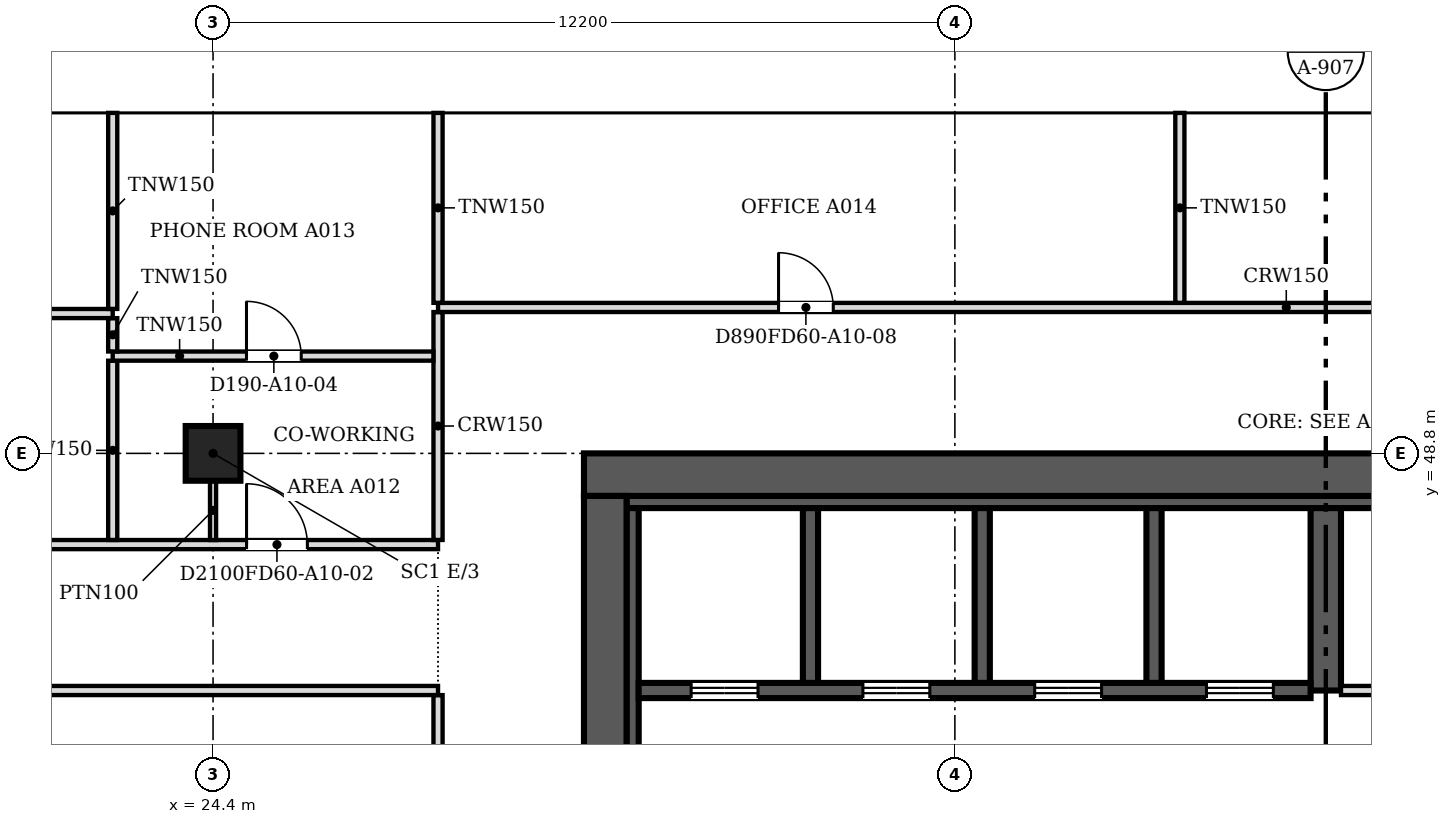
"""IFC4 building model, lengths in metres.
Left out: names, types, materials, properties, quantities, classifications, styles, units other than length and angle.
Written with IfcOpenShell. Run it as: python <this file> out.ifc"""

import sys

from ifc_helpers import new_model, si_unit, direction, frame, frame_2d, origin, origin_2d, place, context, subcontext, project, spatial, polyline, rectangle, outline, extrude, faceted_brep, source, transform, mapped, element, fill, save


model = new_model("IFC4")
c1 = context("Model", 3, precision=1e-05, world=origin(), true_north=direction((0.0, 1.0)))
c2 = subcontext(c1, "Body", "Model", "MODEL_VIEW")
j1 = project(units=[si_unit("LENGTHUNIT", "METRE"), si_unit("PLANEANGLEUNIT", "RADIAN")], contexts=[c1])
p1 = place(None, origin())
s1 = spatial("IfcSite", under=j1, at=p1, CompositionType="ELEMENT")
p2 = place(p1, origin())
s2 = spatial("IfcBuilding", under=s1, at=p2, CompositionType="ELEMENT")
p3 = place(p2, frame((0.0, 0.0, 120.2)))
s3 = spatial("IfcBuildingStorey", under=s2, at=p3, CompositionType="ELEMENT", Elevation=120.2)
p4 = place(p3, frame((24.4, 48.8, 0.0), z_axis=(0.0, 0.0, 1.0), x_axis=(1.0, 0.0, 0.0)))
e1 = element("IfcColumn", 1, at=p4, inside=s3, PredefinedType="COLUMN", context=c2, shape_type="SweptSolid", body=[
    extrude(rectangle(XDim=0.9, YDim=0.9, at=origin_2d()), origin(), (0.0, 0.0, 1.0), 3.6),
])
m1 = source(origin(), c2, "Body", "SweptSolid", [
    extrude(outline(polyline([(3.05, 0.0), (6.1, 3.8), (3.05, 7.6), (0.0, 3.8), (3.05, 0.0)])), frame((0.0, 0.25, 0.0), z_axis=(0.0, -1.0, 0.0), x_axis=(1.0, 0.0, 0.0)), (0.0, 0.0, 1.0), 0.5),
])
p5 = place(p3, frame((45.75, 54.65, -3.8), z_axis=(0.0, 0.0, 1.0), x_axis=(-1.0, 0.0, 0.0)))
e2 = element("IfcWall", 2, at=p5, inside=s3, PredefinedType="SOLIDWALL", context=c2, shape_type="MappedRepresentation", body=[
    mapped(m1, transform((0.0, 0.0, 0.0), scale=1.0)),
])
m2 = source(origin(), c2, "Body", "SweptSolid", [
    extrude(outline(polyline([(3.05, 0.399), (5.78, 3.8), (3.05, 7.201), (0.321, 3.8), (3.05, 0.399)])), frame((0.0, 0.26, 0.0), z_axis=(0.0, -1.0, 0.0), x_axis=(1.0, 0.0, 0.0)), (0.0, 0.0, 1.0), 0.52),
])
p6 = place(p5, origin())
e3 = element("IfcOpeningElement", 3, at=p6, cuts=e2, PredefinedType="OPENING", context=c2, shape_type="MappedRepresentation", body=[
    mapped(m2, transform((0.0, 0.0, 0.0), scale=1.0)),
])
m3 = source(origin(), c2, "Body", "Brep", [
    faceted_brep([(3.05, -0.25, 0.0), (6.1, -0.25, 3.8), (6.1, -0.25, 3.8), (3.05, -0.25, 7.6), (0.0, -0.25, 3.8), (0.0, 0.25, 3.8), (3.05, 0.25, 7.6), (6.1, 0.25, 3.8), (6.1, 0.25, 3.8), (3.05, 0.25, 0.0)], [[[0, 1, 2, 3, 4]], [[5, 6, 7, 8, 9]], [[9, 8, 1, 0]], [[7, 6, 3, 2]], [[6, 5, 4, 3]], [[5, 9, 0, 4]], [[1, 8, 7, 2]]]),
])
p7 = place(p3, frame((39.65, 54.65, -3.8), z_axis=(0.0, 0.0, 1.0), x_axis=(-1.0, 0.0, 0.0)))
e4 = element("IfcWall", 4, at=p7, inside=s3, PredefinedType="SOLIDWALL", context=c2, shape_type="MappedRepresentation", body=[
    mapped(m3, transform((0.0, 0.0, 0.0), scale=1.0)),
])
p8 = place(p7, origin())
e5 = element("IfcOpeningElement", 5, at=p8, cuts=e4, PredefinedType="OPENING", context=c2, shape_type="MappedRepresentation", body=[
    mapped(m2, transform((0.0, 0.0, 0.0), scale=1.0)),
])
p9 = place(p3, frame((33.55, 54.65, -3.8), z_axis=(0.0, 0.0, 1.0), x_axis=(-1.0, 0.0, 0.0)))
e6 = element("IfcWall", 6, at=p9, inside=s3, PredefinedType="SOLIDWALL", context=c2, shape_type="MappedRepresentation", body=[
    mapped(m1, transform((0.0, 0.0, 0.0), scale=1.0)),
])
p10 = place(p9, origin())
e7 = element("IfcOpeningElement", 7, at=p10, cuts=e6, PredefinedType="OPENING", context=c2, shape_type="MappedRepresentation", body=[
    mapped(m2, transform((0.0, 0.0, 0.0), scale=1.0)),
])
p11 = place(p3, frame((27.45, 54.65, -3.8), z_axis=(0.0, 0.0, 1.0), x_axis=(-1.0, 0.0, 0.0)))
e8 = element("IfcWall", 8, at=p11, inside=s3, PredefinedType="SOLIDWALL", context=c2, shape_type="MappedRepresentation", body=[
    mapped(m3, transform((0.0, 0.0, 0.0), scale=1.0)),
])
p12 = place(p11, origin())
e9 = element("IfcOpeningElement", 9, at=p12, cuts=e8, PredefinedType="OPENING", context=c2, shape_type="MappedRepresentation", body=[
    mapped(m2, transform((0.0, 0.0, 0.0), scale=1.0)),
])
p13 = place(p2, frame((0.0, 0.0, 124.0)))
s4 = spatial("IfcBuildingStorey", under=s2, at=p13, CompositionType="ELEMENT", Elevation=124.0)
p14 = place(p13, frame((48.8, 54.65, -3.8), z_axis=(0.0, 0.0, 1.0), x_axis=(-1.0, 0.0, 0.0)))
e10 = element("IfcWall", 10, at=p14, inside=s4, PredefinedType="SOLIDWALL", context=c2, shape_type="MappedRepresentation", body=[
    mapped(m1, transform((0.0, 0.0, 0.0), scale=1.0)),
])
p15 = place(p14, origin())
e11 = element("IfcOpeningElement", 11, at=p15, cuts=e10, PredefinedType="OPENING", context=c2, shape_type="MappedRepresentation", body=[
    mapped(m2, transform((0.0, 0.0, 0.0), scale=1.0)),
])
p16 = place(p13, frame((42.7, 54.65, -3.8), z_axis=(0.0, 0.0, 1.0), x_axis=(-1.0, 0.0, 0.0)))
e12 = element("IfcWall", 12, at=p16, inside=s4, PredefinedType="SOLIDWALL", context=c2, shape_type="MappedRepresentation", body=[
    mapped(m3, transform((0.0, 0.0, 0.0), scale=1.0)),
])
p17 = place(p16, origin())
e13 = element("IfcOpeningElement", 13, at=p17, cuts=e12, PredefinedType="OPENING", context=c2, shape_type="MappedRepresentation", body=[
    mapped(m2, transform((0.0, 0.0, 0.0), scale=1.0)),
])
p18 = place(p13, frame((36.6, 54.65, -3.8), z_axis=(0.0, 0.0, 1.0), x_axis=(-1.0, 0.0, 0.0)))
e14 = element("IfcWall", 14, at=p18, inside=s4, PredefinedType="SOLIDWALL", context=c2, shape_type="MappedRepresentation", body=[
    mapped(m1, transform((0.0, 0.0, 0.0), scale=1.0)),
])
p19 = place(p18, origin())
e15 = element("IfcOpeningElement", 15, at=p19, cuts=e14, PredefinedType="OPENING", context=c2, shape_type="MappedRepresentation", body=[
    mapped(m2, transform((0.0, 0.0, 0.0), scale=1.0)),
])
p20 = place(p13, frame((30.5, 54.65, -3.8), z_axis=(0.0, 0.0, 1.0), x_axis=(-1.0, 0.0, 0.0)))
e16 = element("IfcWall", 16, at=p20, inside=s4, PredefinedType="SOLIDWALL", context=c2, shape_type="MappedRepresentation", body=[
    mapped(m1, transform((0.0, 0.0, 0.0), scale=1.0)),
])
p21 = place(p20, origin())
e17 = element("IfcOpeningElement", 17, at=p21, cuts=e16, PredefinedType="OPENING", context=c2, shape_type="MappedRepresentation", body=[
    mapped(m2, transform((0.0, 0.0, 0.0), scale=1.0)),
])
p22 = place(p13, frame((24.4, 54.65, -3.8), z_axis=(0.0, 0.0, 1.0), x_axis=(-1.0, 0.0, 0.0)))
e18 = element("IfcWall", 18, at=p22, inside=s4, PredefinedType="SOLIDWALL", context=c2, shape_type="MappedRepresentation", body=[
    mapped(m3, transform((0.0, 0.0, 0.0), scale=1.0)),
])
p23 = place(p22, origin())
e19 = element("IfcOpeningElement", 19, at=p23, cuts=e18, PredefinedType="OPENING", context=c2, shape_type="MappedRepresentation", body=[
    mapped(m2, transform((0.0, 0.0, 0.0), scale=1.0)),
])
p24 = place(p3, frame((30.85, 25.1, 0.0), z_axis=(0.0, 0.0, 1.0), x_axis=(0.0, 1.0, 0.0)))
e20 = element("IfcWall", 20, at=p24, inside=s3, PredefinedType="SHEAR", context=c2, shape_type="SweptSolid", body=[
    extrude(rectangle(XDim=23.0, YDim=0.7, at=frame_2d((11.5, 0.0))), origin(), (0.0, 0.0, 1.0), 3.8),
])
m4 = source(origin(), c2, "Body", "SweptSolid", [
    extrude(rectangle(XDim=2.1, YDim=2.4, at=frame_2d((1.05, 1.2))), frame((0.0, 0.36, 0.0), z_axis=(0.0, -1.0, 0.0), x_axis=(1.0, 0.0, 0.0)), (0.0, 0.0, 1.0), 0.72),
])
p25 = place(p24, frame((4.7, 0.0, 0.0)))
e21 = element("IfcOpeningElement", 21, at=p25, cuts=e20, PredefinedType="OPENING", context=c2, shape_type="MappedRepresentation", body=[
    mapped(m4, transform((0.0, 0.0, 0.0), scale=1.0)),
])
p26 = place(p24, frame((16.2, 0.0, 0.0)))
e22 = element("IfcOpeningElement", 22, at=p26, cuts=e20, PredefinedType="OPENING", context=c2, shape_type="MappedRepresentation", body=[
    mapped(m4, transform((0.0, 0.0, 0.0), scale=1.0)),
])
p27 = place(p3, frame((30.5, 48.45, 0.0), z_axis=(0.0, 0.0, 1.0), x_axis=(1.0, 0.0, 0.0)))
e23 = element("IfcWall", 23, at=p27, inside=s3, PredefinedType="SHEAR", context=c2, shape_type="SweptSolid", body=[
    extrude(rectangle(XDim=24.4, YDim=0.7, at=frame_2d((12.2, 0.0))), origin(), (0.0, 0.0, 1.0), 3.8),
])
p28 = place(p3, frame((31.2, 48.0, 0.0), z_axis=(0.0, 0.0, 1.0), x_axis=(1.0, 0.0, 0.0)))
e24 = element("IfcWall", 24, at=p28, inside=s3, PredefinedType="SOLIDWALL", context=c2, shape_type="SweptSolid", body=[
    extrude(rectangle(XDim=23.0, YDim=0.2, at=frame_2d((11.5, 0.0))), origin(), (0.0, 0.0, 1.0), 3.8),
])
p29 = place(p3, frame((31.3, 43.4, 0.0), z_axis=(0.0, 0.0, 1.0), x_axis=(0.0, 1.0, 0.0)))
e25 = element("IfcWall", 25, at=p29, inside=s3, PredefinedType="SOLIDWALL", context=c2, shape_type="SweptSolid", body=[
    extrude(rectangle(XDim=4.5, YDim=0.2, at=frame_2d((2.25, 0.0))), origin(), (0.0, 0.0, 1.0), 3.8),
])
p30 = place(p3, frame((42.7, 44.9, 0.0), z_axis=(0.0, 0.0, 1.0), x_axis=(0.0, 1.0, 0.0)))
e26 = element("IfcWall", 26, at=p30, inside=s3, PredefinedType="SHEAR", context=c2, shape_type="SweptSolid", body=[
    extrude(rectangle(XDim=3.0, YDim=0.5, at=frame_2d((1.5, 0.0))), origin(), (0.0, 0.0, 1.0), 3.8),
])
p31 = place(p3, frame((42.45, 44.9, 0.0), z_axis=(0.0, 0.0, 1.0), x_axis=(-1.0, 0.0, 0.0)))
e27 = element("IfcWall", 27, at=p31, inside=s3, PredefinedType="SOLIDWALL", context=c2, shape_type="SweptSolid", body=[
    extrude(rectangle(XDim=11.05, YDim=0.25, at=frame_2d((5.525, 0.0))), origin(), (0.0, 0.0, 1.0), 3.8),
])
m5 = source(origin(), c2, "Body", "SweptSolid", [
    extrude(rectangle(XDim=1.1, YDim=2.1, at=frame_2d((0.55, 1.05))), frame((0.0, 0.135, 0.0), z_axis=(0.0, -1.0, 0.0), x_axis=(1.0, 0.0, 0.0)), (0.0, 0.0, 1.0), 0.27),
])
p32 = place(p31, frame((9.087, 0.0, 0.0)))
e28 = element("IfcOpeningElement", 28, at=p32, cuts=e27, PredefinedType="OPENING", context=c2, shape_type="MappedRepresentation", body=[
    mapped(m5, transform((0.0, 0.0, 0.0), scale=1.0)),
])
p33 = place(p31, frame((6.262, 0.0, 0.0)))
e29 = element("IfcOpeningElement", 29, at=p33, cuts=e27, PredefinedType="OPENING", context=c2, shape_type="MappedRepresentation", body=[
    mapped(m5, transform((0.0, 0.0, 0.0), scale=1.0)),
])
p34 = place(p31, frame((3.438, 0.0, 0.0)))
e30 = element("IfcOpeningElement", 30, at=p34, cuts=e27, PredefinedType="OPENING", context=c2, shape_type="MappedRepresentation", body=[
    mapped(m5, transform((0.0, 0.0, 0.0), scale=1.0)),
])
p35 = place(p31, frame((0.613, 0.0, 0.0)))
e31 = element("IfcOpeningElement", 31, at=p35, cuts=e27, PredefinedType="OPENING", context=c2, shape_type="MappedRepresentation", body=[
    mapped(m5, transform((0.0, 0.0, 0.0), scale=1.0)),
])
for number, where, z_axis, x_axis in (
    (32, (34.225, 45.025, 0.0), (0.0, 0.0, 1.0), (0.0, 1.0, 0.0)),
    (33, (37.05, 45.025, 0.0), (0.0, 0.0, 1.0), (0.0, 1.0, 0.0)),
    (34, (39.875, 45.025, 0.0), (0.0, 0.0, 1.0), (0.0, 1.0, 0.0)),
):
    element("IfcWall", number, at=place(p3, frame(where, z_axis=z_axis, x_axis=x_axis)), inside=s3, PredefinedType="SOLIDWALL", context=c2, shape_type="SweptSolid", body=[
        extrude(rectangle(XDim=2.875, YDim=0.25, at=frame_2d((1.438, 0.0))), origin(), (0.0, 0.0, 1.0), 3.8),
    ])
p36 = place(p3, frame((42.95, 44.9, 0.0), z_axis=(0.0, 0.0, 1.0), x_axis=(1.0, 0.0, 0.0)))
e35 = element("IfcWall", 35, at=p36, inside=s3, PredefinedType="PARTITIONING", context=c2, shape_type="SweptSolid", body=[
    extrude(rectangle(XDim=5.275, YDim=0.15, at=frame_2d((2.638, 0.0))), origin(), (0.0, 0.0, 1.0), 3.6),
])
m6 = source(origin(), c2, "Body", "SweptSolid", [
    extrude(rectangle(XDim=0.9, YDim=2.1, at=frame_2d((0.45, 1.05))), frame((0.0, 0.085, 0.0), z_axis=(0.0, -1.0, 0.0), x_axis=(1.0, 0.0, 0.0)), (0.0, 0.0, 1.0), 0.17),
])
p37 = place(p36, frame((0.712, 0.0, 0.0)))
e36 = element("IfcOpeningElement", 36, at=p37, cuts=e35, PredefinedType="OPENING", context=c2, shape_type="MappedRepresentation", body=[
    mapped(m6, transform((0.0, 0.0, 0.0), scale=1.0)),
])
p38 = place(p36, frame((3.5, 0.0, 0.0)))
e37 = element("IfcOpeningElement", 37, at=p38, cuts=e35, PredefinedType="OPENING", context=c2, shape_type="MappedRepresentation", body=[
    mapped(m6, transform((0.0, 0.0, 0.0), scale=1.0)),
])
p39 = place(p3, frame((28.1, 18.8, 0.0), z_axis=(0.0, 0.0, 1.0), x_axis=(0.0, 1.0, 0.0)))
e38 = element("IfcWall", 38, at=p39, inside=s3, PredefinedType="PARTITIONING", context=c2, shape_type="SweptSolid", body=[
    extrude(rectangle(XDim=26.024, YDim=0.15, at=frame_2d((13.012, 0.0))), origin(), (0.0, 0.0, 1.0), 3.067),
])
p40 = place(p39, frame((1.1, 0.0, 0.0)))
e39 = element("IfcOpeningElement", 39, at=p40, cuts=e38, PredefinedType="OPENING", context=c2, shape_type="MappedRepresentation", body=[
    mapped(m6, transform((0.0, 0.0, 0.0), scale=1.0)),
])
p41 = place(p39, frame((14.301, 0.0, 0.0)))
e40 = element("IfcOpeningElement", 40, at=p41, cuts=e38, PredefinedType="OPENING", context=c2, shape_type="MappedRepresentation", body=[
    mapped(m6, transform((0.0, 0.0, 0.0), scale=1.0)),
])
p42 = place(p39, frame((8.2, 0.0, 0.0)))
e41 = element("IfcOpeningElement", 41, at=p42, cuts=e38, PredefinedType="OPENING", context=c2, shape_type="MappedRepresentation", body=[
    mapped(m6, transform((0.0, 0.0, 0.0), scale=1.0)),
])
p43 = place(p39, frame((21.5, 0.0, 0.0)))
e42 = element("IfcOpeningElement", 42, at=p43, cuts=e38, PredefinedType="OPENING", context=c2, shape_type="MappedRepresentation", body=[
    mapped(m6, transform((0.0, 0.0, 0.0), scale=1.0)),
])
p44 = place(p3, frame((28.1, 44.9, 0.0), z_axis=(0.0, 0.0, 1.0), x_axis=(-1.0, 0.0, 0.0)))
e43 = element("IfcWall", 43, at=p44, inside=s3, PredefinedType="PARTITIONING", context=c2, shape_type="SweptSolid", body=[
    extrude(rectangle(XDim=20.6, YDim=0.15, at=frame_2d((10.3, 0.0))), origin(), (0.0, 0.0, 1.0), 3.067),
])
m7 = source(origin(), c2, "Body", "SweptSolid", [
    extrude(rectangle(XDim=1.0, YDim=2.1, at=frame_2d((0.5, 1.05))), frame((0.0, 0.085, 0.0), z_axis=(0.0, -1.0, 0.0), x_axis=(1.0, 0.0, 0.0)), (0.0, 0.0, 1.0), 0.17),
])
p45 = place(p44, frame((17.8, 0.0, 0.0)))
e44 = element("IfcOpeningElement", 44, at=p45, cuts=e43, PredefinedType="OPENING", context=c2, shape_type="MappedRepresentation", body=[
    mapped(m7, transform((0.0, 0.0, 0.0), scale=1.0)),
])
p46 = place(p3, frame((7.5, 47.3, 0.0), z_axis=(0.0, 0.0, 1.0), x_axis=(1.0, 0.0, 0.0)))
e45 = element("IfcWall", 45, at=p46, inside=s3, PredefinedType="PARTITIONING", context=c2, shape_type="SweptSolid", body=[
    extrude(rectangle(XDim=20.6, YDim=0.15, at=frame_2d((10.3, 0.0))), origin(), (0.0, 0.0, 1.0), 3.067),
])
p47 = place(p46, frame((17.451, 0.0, 0.0)))
e46 = element("IfcOpeningElement", 46, at=p47, cuts=e45, PredefinedType="OPENING", context=c2, shape_type="MappedRepresentation", body=[
    mapped(m7, transform((0.0, 0.0, 0.0), scale=1.0)),
])
p48 = place(p46, frame((2.5, 0.0, 0.0)))
e47 = element("IfcOpeningElement", 47, at=p48, cuts=e45, PredefinedType="OPENING", context=c2, shape_type="MappedRepresentation", body=[
    mapped(m7, transform((0.0, 0.0, 0.0), scale=1.0)),
])
p49 = place(p46, frame((10.2, 0.0, 0.0)))
e48 = element("IfcOpeningElement", 48, at=p49, cuts=e45, PredefinedType="OPENING", context=c2, shape_type="MappedRepresentation", body=[
    mapped(m7, transform((0.0, 0.0, 0.0), scale=1.0)),
])
p50 = place(p3, frame((22.75, 47.376, 0.0), z_axis=(0.0, 0.0, 1.0), x_axis=(0.0, 1.0, 0.0)))
e49 = element("IfcWall", 49, at=p50, inside=s3, PredefinedType="PARTITIONING", context=c2, shape_type="SweptSolid", body=[
    extrude(rectangle(XDim=2.948, YDim=0.15, at=frame_2d((1.474, 0.0))), origin(), (0.0, 0.0, 1.0), 3.067),
])
p51 = place(p3, frame((28.1, 47.376, 0.0), z_axis=(0.0, 0.0, 1.0), x_axis=(0.0, 1.0, 0.0)))
e50 = element("IfcWall", 50, at=p51, inside=s3, PredefinedType="PARTITIONING", context=c2, shape_type="SweptSolid", body=[
    extrude(rectangle(XDim=3.748, YDim=0.15, at=frame_2d((1.874, 0.0))), origin(), (0.0, 0.0, 1.0), 3.067),
])
p52 = place(p3, frame((24.4, 48.35, 0.0), z_axis=(0.0, 0.0, 1.0), x_axis=(0.0, -1.0, 0.0)))
e51 = element("IfcWall", 51, at=p52, inside=s3, PredefinedType="PARTITIONING", context=c2, shape_type="SweptSolid", body=[
    extrude(rectangle(XDim=0.975, YDim=0.1, at=frame_2d((0.488, 0.0))), origin(), (0.0, 0.0, 1.0), 3.067),
])
p53 = place(p3, frame((22.75, 50.4, 0.0), z_axis=(0.0, 0.0, 1.0), x_axis=(1.0, 0.0, 0.0)))
e52 = element("IfcWall", 52, at=p53, inside=s3, PredefinedType="PARTITIONING", context=c2, shape_type="SweptSolid", body=[
    extrude(rectangle(XDim=5.274, YDim=0.15, at=frame_2d((2.637, 0.0))), origin(), (0.0, 0.0, 1.0), 3.067),
])
p54 = place(p53, frame((2.2, 0.0, 0.0)))
e53 = element("IfcOpeningElement", 53, at=p54, cuts=e52, PredefinedType="OPENING", context=c2, shape_type="MappedRepresentation", body=[
    mapped(m6, transform((0.0, 0.0, 0.0), scale=1.0)),
])
p55 = place(p3, frame((22.75, 50.476, 0.0), z_axis=(0.0, 0.0, 1.0), x_axis=(0.0, 1.0, 0.0)))
e54 = element("IfcWall", 54, at=p55, inside=s3, PredefinedType="PARTITIONING", context=c2, shape_type="SweptSolid", body=[
    extrude(rectangle(XDim=0.548, YDim=0.15, at=frame_2d((0.274, 0.0))), origin(), (0.0, 0.0, 1.0), 3.067),
])
p56 = place(p3, frame((13.6, 51.1, 0.0), z_axis=(0.0, 0.0, 1.0), x_axis=(1.0, 0.0, 0.0)))
e55 = element("IfcWall", 55, at=p56, inside=s3, PredefinedType="PARTITIONING", context=c2, shape_type="SweptSolid", body=[
    extrude(rectangle(XDim=9.15, YDim=0.15, at=frame_2d((4.575, 0.0))), origin(), (0.0, 0.0, 1.0), 3.067),
])
p57 = place(p56, frame((1.8, 0.0, 0.0)))
e56 = element("IfcOpeningElement", 56, at=p57, cuts=e55, PredefinedType="OPENING", context=c2, shape_type="MappedRepresentation", body=[
    mapped(m6, transform((0.0, 0.0, 0.0), scale=1.0)),
])
p58 = place(p56, frame((6.32, 0.0, 0.0)))
e57 = element("IfcOpeningElement", 57, at=p58, cuts=e55, PredefinedType="OPENING", context=c2, shape_type="MappedRepresentation", body=[
    mapped(m6, transform((0.0, 0.0, 0.0), scale=1.0)),
])
p59 = place(p3, frame((22.75, 51.176, 0.0), z_axis=(0.0, 0.0, 1.0), x_axis=(0.0, 1.0, 0.0)))
e58 = element("IfcWall", 58, at=p59, inside=s3, PredefinedType="PARTITIONING", context=c2, shape_type="SweptSolid", body=[
    extrude(rectangle(XDim=3.224, YDim=0.15, at=frame_2d((1.612, 0.0))), origin(), (0.0, 0.0, 1.0), 3.067),
])
p60 = place(p3, frame((28.1, 51.2, 0.0), z_axis=(0.0, 0.0, 1.0), x_axis=(1.0, 0.0, 0.0)))
e59 = element("IfcWall", 59, at=p60, inside=s3, PredefinedType="PARTITIONING", context=c2, shape_type="SweptSolid", body=[
    extrude(rectangle(XDim=31.438, YDim=0.15, at=frame_2d((15.719, 0.0))), origin(), (0.0, 0.0, 1.0), 3.067),
])
p61 = place(p60, frame((5.6, 0.0, 0.0)))
e60 = element("IfcOpeningElement", 60, at=p61, cuts=e59, PredefinedType="OPENING", context=c2, shape_type="MappedRepresentation", body=[
    mapped(m6, transform((0.0, 0.0, 0.0), scale=1.0)),
])
p62 = place(p60, frame((21.4, 0.0, 0.0)))
e61 = element("IfcOpeningElement", 61, at=p62, cuts=e59, PredefinedType="OPENING", context=c2, shape_type="MappedRepresentation", body=[
    mapped(m6, transform((0.0, 0.0, 0.0), scale=1.0)),
])
for number, where, z_axis, x_axis in (
    (62, (28.1, 51.276, 0.0), (0.0, 0.0, 1.0), (0.0, 1.0, 0.0)),
    (63, (40.3, 51.276, 0.0), (0.0, 0.0, 1.0), (0.0, 1.0, 0.0)),
):
    element("IfcWall", number, at=place(p3, frame(where, z_axis=z_axis, x_axis=x_axis)), inside=s3, PredefinedType="PARTITIONING", context=c2, shape_type="SweptSolid", body=[
        extrude(rectangle(XDim=3.124, YDim=0.15, at=frame_2d((1.562, 0.0))), origin(), (0.0, 0.0, 1.0), 3.067),
    ])
m8 = source(origin(), c2, "Body", "SweptSolid", [
    extrude(rectangle(XDim=1.1, YDim=2.1, at=frame_2d((0.55, 1.05))), frame((0.0, 0.025, 0.0), z_axis=(0.0, -1.0, 0.0), x_axis=(1.0, 0.0, 0.0)), (0.0, 0.0, 1.0), 0.05),
])
p63 = place(p32, origin())
e64 = element("IfcDoor", 64, at=p63, inside=s3, OperationType="DOUBLE_DOOR_SLIDING", PredefinedType="DOOR", context=c2, shape_type="MappedRepresentation", body=[
    mapped(m8, transform((0.0, 0.0, 0.0), scale=1.0)),
])
fill(e28, e64)
p64 = place(p33, origin())
e65 = element("IfcDoor", 65, at=p64, inside=s3, OperationType="DOUBLE_DOOR_SLIDING", PredefinedType="DOOR", context=c2, shape_type="MappedRepresentation", body=[
    mapped(m8, transform((0.0, 0.0, 0.0), scale=1.0)),
])
fill(e29, e65)
p65 = place(p34, origin())
e66 = element("IfcDoor", 66, at=p65, inside=s3, OperationType="DOUBLE_DOOR_SLIDING", PredefinedType="DOOR", context=c2, shape_type="MappedRepresentation", body=[
    mapped(m8, transform((0.0, 0.0, 0.0), scale=1.0)),
])
fill(e30, e66)
p66 = place(p35, origin())
e67 = element("IfcDoor", 67, at=p66, inside=s3, OperationType="DOUBLE_DOOR_SLIDING", PredefinedType="DOOR", context=c2, shape_type="MappedRepresentation", body=[
    mapped(m8, transform((0.0, 0.0, 0.0), scale=1.0)),
])
fill(e31, e67)
m9 = source(origin(), c2, "Body", "SweptSolid", [
    extrude(rectangle(XDim=0.9, YDim=2.1, at=frame_2d((0.45, 1.05))), frame((0.0, 0.025, 0.0), z_axis=(0.0, -1.0, 0.0), x_axis=(1.0, 0.0, 0.0)), (0.0, 0.0, 1.0), 0.05),
])
p67 = place(p54, origin())
e68 = element("IfcDoor", 68, at=p67, inside=s3, OperationType="SINGLE_SWING_LEFT", PredefinedType="DOOR", context=c2, shape_type="MappedRepresentation", body=[
    mapped(m9, transform((0.0, 0.0, 0.0), scale=1.0)),
])
fill(e53, e68)
m10 = source(origin(), c2, "Body", "SweptSolid", [
    extrude(rectangle(XDim=1.0, YDim=2.1, at=frame_2d((0.5, 1.05))), frame((0.0, 0.025, 0.0), z_axis=(0.0, -1.0, 0.0), x_axis=(1.0, 0.0, 0.0)), (0.0, 0.0, 1.0), 0.05),
])
p68 = place(p47, origin())
e69 = element("IfcDoor", 69, at=p68, inside=s3, OperationType="SINGLE_SWING_LEFT", PredefinedType="DOOR", context=c2, shape_type="MappedRepresentation", body=[
    mapped(m10, transform((0.0, 0.0, 0.0), scale=1.0)),
])
fill(e46, e69)
p69 = place(p61, origin())
e70 = element("IfcDoor", 70, at=p69, inside=s3, OperationType="SINGLE_SWING_LEFT", PredefinedType="DOOR", context=c2, shape_type="MappedRepresentation", body=[
    mapped(m9, transform((0.0, 0.0, 0.0), scale=1.0)),
])
fill(e60, e70)
save(model, sys.argv[1])
